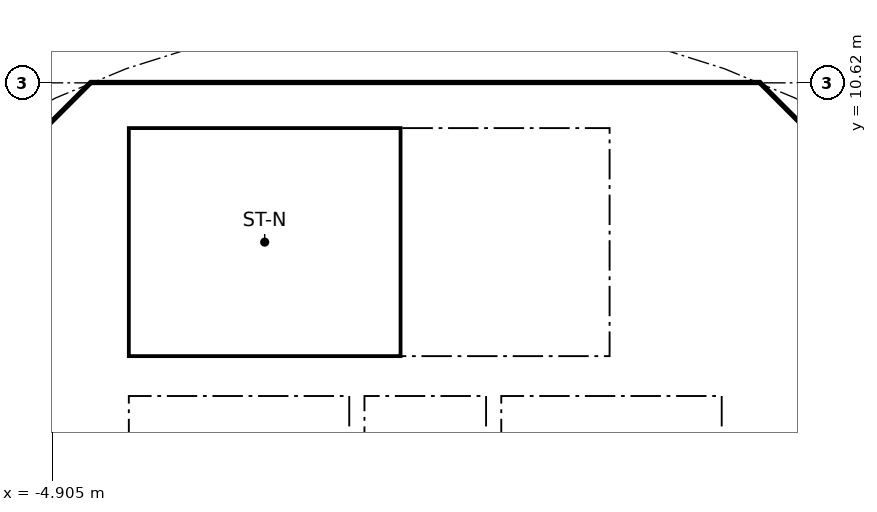
"""IFC4 building model, lengths in metres.
Left out: names, types, materials, properties, quantities, classifications, styles, units other than length and angle.
Written with IfcOpenShell. Run it as: python <this file> out.ifc"""

import sys

from ifc_helpers import new_model, si_unit, direction, frame, frame_2d, origin, place, context, subcontext, project, spatial, polyline, rectangle, outline, extrude, element, fill, save


model = new_model("IFC4")
c1 = context("Model", 3, precision=1e-05, world=origin(), true_north=direction((0.0, 1.0)))
c2 = subcontext(c1, "Body", "Model", "MODEL_VIEW")
j1 = project(units=[si_unit("LENGTHUNIT", "METRE"), si_unit("PLANEANGLEUNIT", "RADIAN")], contexts=[c1])
p1 = place(None, origin())
s1 = spatial("IfcSite", under=j1, at=p1, CompositionType="ELEMENT")
p2 = place(p1, origin())
s2 = spatial("IfcBuilding", under=s1, at=p2, CompositionType="ELEMENT")
p3 = place(p2, frame((0.0, 0.0, 262.2)))
s3 = spatial("IfcBuildingStorey", under=s2, at=p3, CompositionType="ELEMENT", Elevation=262.2)
p4 = place(p3, frame((9.988, 4.613, 0.0), z_axis=(0.0, 0.0, 1.0), x_axis=(-0.707106781187, 0.707106781187, 0.0)))
e1 = element("IfcWall", 1, at=p4, inside=s3, PredefinedType="SHEAR", context=c2, shape_type="SweptSolid", body=[
    extrude(rectangle(XDim=7.602, YDim=0.6, at=frame_2d((3.801, 0.0))), origin(), (0.0, 0.0, 1.0), 3.44),
])
p5 = place(p4, frame((3.201, 0.0, 0.0)))
e2 = element("IfcOpeningElement", 2, at=p5, cuts=e1, PredefinedType="OPENING", context=c2, shape_type="SweptSolid", body=[
    extrude(rectangle(XDim=1.2, YDim=2.1, at=frame_2d((0.6, 1.05))), frame((0.0, 0.31, 0.0), z_axis=(0.0, -1.0, 0.0), x_axis=(1.0, 0.0, 0.0)), (0.0, 0.0, 1.0), 0.62),
])
p6 = place(p3, frame((-4.613, 9.988, 0.0), z_axis=(0.0, 0.0, 1.0), x_axis=(-0.707106781187, -0.707106781187, 0.0)))
e3 = element("IfcWall", 3, at=p6, inside=s3, PredefinedType="SHEAR", context=c2, shape_type="SweptSolid", body=[
    extrude(rectangle(XDim=7.602, YDim=0.6, at=frame_2d((3.801, 0.0))), origin(), (0.0, 0.0, 1.0), 3.44),
])
p7 = place(p6, frame((0.351, 0.0, 0.0)))
e4 = element("IfcOpeningElement", 4, at=p7, cuts=e3, PredefinedType="OPENING", context=c2, shape_type="SweptSolid", body=[
    extrude(rectangle(XDim=1.1, YDim=2.1, at=frame_2d((0.55, 1.05))), frame((0.0, 0.31, 0.0), z_axis=(0.0, -1.0, 0.0), x_axis=(1.0, 0.0, 0.0)), (0.0, 0.0, 1.0), 0.62),
])
p8 = place(p3, frame((4.0, 4.3, 0.0), z_axis=(0.0, 0.0, 1.0), x_axis=(0.0, 1.0, 0.0)))
e5 = element("IfcWall", 5, at=p8, inside=s3, PredefinedType="SOLIDWALL", context=c2, shape_type="SweptSolid", body=[
    extrude(rectangle(XDim=2.2, YDim=0.2, at=frame_2d((1.1, 0.0))), origin(), (0.0, 0.0, 1.0), 3.44),
])
p9 = place(p8, frame((0.55, 0.0, 0.0)))
e6 = element("IfcOpeningElement", 6, at=p9, cuts=e5, PredefinedType="OPENING", context=c2, shape_type="SweptSolid", body=[
    extrude(rectangle(XDim=1.1, YDim=2.1, at=frame_2d((0.55, 1.05))), frame((0.0, 0.11, 0.0), z_axis=(0.0, -1.0, 0.0), x_axis=(1.0, 0.0, 0.0)), (0.0, 0.0, 1.0), 0.22),
])
p10 = place(p3, frame((-4.0, 4.3, 0.0), z_axis=(0.0, 0.0, 1.0), x_axis=(0.0, 1.0, 0.0)))
e7 = element("IfcWall", 7, at=p10, inside=s3, PredefinedType="SOLIDWALL", context=c2, shape_type="SweptSolid", body=[
    extrude(rectangle(XDim=2.2, YDim=0.2, at=frame_2d((1.1, 0.0))), origin(), (0.0, 0.0, 1.0), 3.44),
])
p11 = place(p10, frame((0.55, 0.0, 0.0)))
e8 = element("IfcOpeningElement", 8, at=p11, cuts=e7, PredefinedType="OPENING", context=c2, shape_type="SweptSolid", body=[
    extrude(rectangle(XDim=1.1, YDim=2.1, at=frame_2d((0.55, 1.05))), frame((0.0, 0.11, 0.0), z_axis=(0.0, -1.0, 0.0), x_axis=(1.0, 0.0, 0.0)), (0.0, 0.0, 1.0), 0.22),
])
p12 = place(p3, frame((4.0, 7.025, 0.0), z_axis=(0.0, 0.0, 1.0), x_axis=(0.0, 1.0, 0.0)))
e9 = element("IfcWall", 9, at=p12, inside=s3, PredefinedType="SOLIDWALL", context=c2, shape_type="SweptSolid", body=[
    extrude(rectangle(XDim=3.0, YDim=0.2, at=frame_2d((1.5, 0.0))), origin(), (0.0, 0.0, 1.0), 3.44),
])
p13 = place(p12, frame((0.925, 0.0, 0.0)))
e10 = element("IfcOpeningElement", 10, at=p13, cuts=e9, PredefinedType="OPENING", context=c2, shape_type="SweptSolid", body=[
    extrude(rectangle(XDim=1.1, YDim=2.1, at=frame_2d((0.55, 1.05))), frame((0.0, 0.11, 0.0), z_axis=(0.0, -1.0, 0.0), x_axis=(1.0, 0.0, 0.0)), (0.0, 0.0, 1.0), 0.22),
])
p14 = place(p3, origin())
e11 = element("IfcWall", 11, at=p14, inside=s3, PredefinedType="SHEAR", context=c2, shape_type="SweptSolid", body=[
    extrude(outline(polyline([(-4.152, 10.025), (-4.401, 9.776), (-4.825, 10.2), (-4.401, 10.625), (4.401, 10.625), (4.825, 10.2), (4.401, 9.776), (4.152, 10.025), (-4.152, 10.025)])), origin(), (0.0, 0.0, 1.0), 3.44),
])
for number, where, z_axis, x_axis in (
    (12, (-0.9, 4.3, 0.0), (0.0, 0.0, 1.0), (0.0, 1.0, 0.0)),
    (13, (0.9, 4.3, 0.0), (0.0, 0.0, 1.0), (0.0, 1.0, 0.0)),
):
    element("IfcWall", number, at=place(p3, frame(where, z_axis=z_axis, x_axis=x_axis)), inside=s3, PredefinedType="SOLIDWALL", context=c2, shape_type="SweptSolid", body=[
        extrude(rectangle(XDim=2.2, YDim=0.2, at=frame_2d((1.1, 0.0))), origin(), (0.0, 0.0, 1.0), 3.44),
    ])
p15 = place(p3, origin())
e14 = element("IfcWall", 14, at=p15, inside=s3, PredefinedType="SOLIDWALL", context=c2, shape_type="SweptSolid", body=[
    extrude(outline(polyline([(-3.9, 7.025), (-4.1, 7.025), (-4.1, 10.025), (-3.9, 10.025), (-3.9, 7.025)])), origin(), (0.0, 0.0, 1.0), 3.44),
])
p16 = place(p3, origin())
e15 = element("IfcWall", 15, at=p16, inside=s3, PredefinedType="SOLIDWALL", context=c2, shape_type="SweptSolid", body=[
    extrude(outline(polyline([(4.1, 6.5), (-4.1, 6.5), (-4.1, 7.025), (4.1, 7.025), (4.1, 6.5)])), origin(), (0.0, 0.0, 1.0), 3.44),
])
p17 = place(p13, origin())
e16 = element("IfcDoor", 16, at=p17, inside=s3, OperationType="SINGLE_SWING_RIGHT", PredefinedType="DOOR", context=c2, shape_type="SweptSolid", body=[
    extrude(rectangle(XDim=1.1, YDim=2.1, at=frame_2d((0.55, 1.05))), frame((0.0, 0.025, 0.0), z_axis=(0.0, -1.0, 0.0), x_axis=(1.0, 0.0, 0.0)), (0.0, 0.0, 1.0), 0.05),
])
fill(e10, e16)
p18 = place(p7, origin())
e17 = element("IfcDoor", 17, at=p18, inside=s3, OperationType="SINGLE_SWING_RIGHT", PredefinedType="DOOR", context=c2, shape_type="SweptSolid", body=[
    extrude(rectangle(XDim=1.1, YDim=2.1, at=frame_2d((0.55, 1.05))), frame((0.0, 0.025, 0.0), z_axis=(0.0, -1.0, 0.0), x_axis=(1.0, 0.0, 0.0)), (0.0, 0.0, 1.0), 0.05),
])
fill(e4, e17)
save(model, sys.argv[1])
